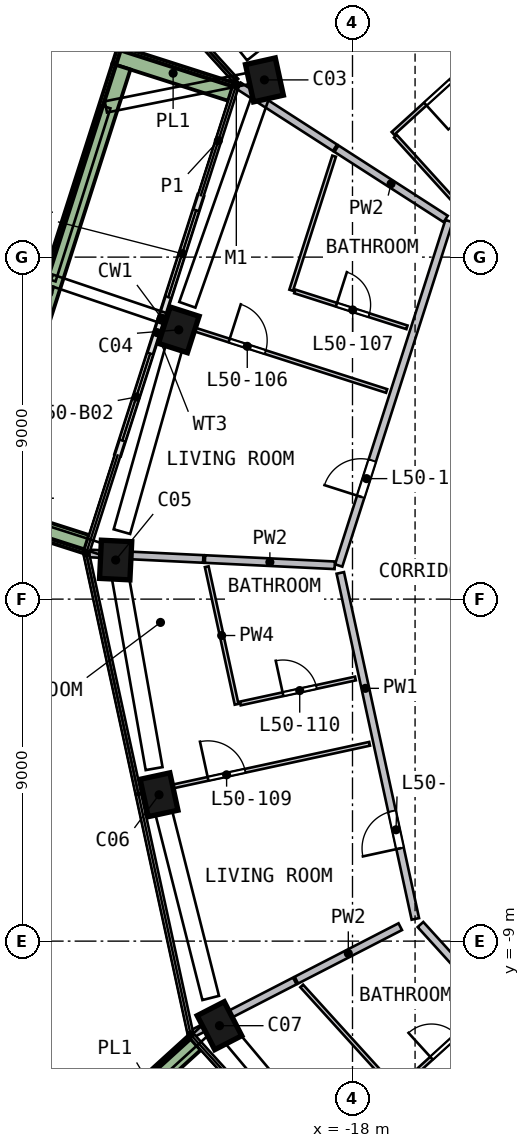
"""IFC4 building model, lengths in metres.
Left out: names, types, materials, properties, quantities, classifications, styles, units other than length and angle.
Written with IfcOpenShell. Run it as: python <this file> out.ifc"""

import sys

from ifc_helpers import new_model, si_unit, direction, frame, frame_2d, origin, origin_2d, place, context, subcontext, project, spatial, rectangle, extrude, element, fill, save


model = new_model("IFC4")
c1 = context("Model", 3, precision=1e-05, world=origin(), true_north=direction((0.0, 1.0)))
c2 = subcontext(c1, "Body", "Model", "MODEL_VIEW")
j1 = project(units=[si_unit("LENGTHUNIT", "METRE"), si_unit("PLANEANGLEUNIT", "RADIAN")], contexts=[c1])
p1 = place(None, origin())
s1 = spatial("IfcSite", under=j1, at=p1, CompositionType="ELEMENT")
p2 = place(p1, origin())
s2 = spatial("IfcBuilding", under=s1, at=p2, CompositionType="ELEMENT")
p3 = place(p2, frame((0.0, 0.0, 205.5)))
s3 = spatial("IfcBuildingStorey", under=s2, at=p3, CompositionType="ELEMENT", Elevation=205.5)
p4 = place(p3, frame((-20.239, 13.781, 0.0), z_axis=(-0.06476386, -0.096765721, 0.993197884), x_axis=(-0.217556406, 0.972715504, 0.080583865)))
e1 = element("IfcColumn", 1, at=p4, inside=s3, PredefinedType="COLUMN", context=c2, shape_type="SweptSolid", body=[
    extrude(rectangle(XDim=1.0, YDim=0.8, at=origin_2d()), origin(), (0.0, 0.0, 1.0), 3.212),
])
p5 = place(p3, frame((-22.531, 7.217, 0.0), z_axis=(-0.033461235, -0.107456192, 0.993646573), x_axis=(-0.303463828, -0.946173408, -0.11254149)))
e2 = element("IfcColumn", 2, at=p5, inside=s3, PredefinedType="COLUMN", context=c2, shape_type="SweptSolid", body=[
    extrude(rectangle(XDim=1.0, YDim=0.8, at=origin_2d()), origin(), (0.0, 0.0, 1.0), 3.21),
])
p6 = place(p3, frame((-24.227, 1.168, 0.0), z_axis=(-0.004561423, -0.115251947, 0.993325819), x_axis=(0.047708269, 0.992179948, 0.115338076)))
e3 = element("IfcColumn", 3, at=p6, inside=s3, PredefinedType="COLUMN", context=c2, shape_type="SweptSolid", body=[
    extrude(rectangle(XDim=1.0, YDim=0.8, at=origin_2d()), origin(), (0.0, 0.0, 1.0), 3.211),
])
p7 = place(p3, frame((-23.121, -5.016, 0.0), z_axis=(0.024791644, -0.109813294, 0.993643002), x_axis=(0.210587098, -0.971071774, -0.112573017)))
e4 = element("IfcColumn", 4, at=p7, inside=s3, PredefinedType="COLUMN", context=c2, shape_type="SweptSolid", body=[
    extrude(rectangle(XDim=1.0, YDim=0.8, at=origin_2d()), origin(), (0.0, 0.0, 1.0), 3.21),
])
p8 = place(p3, frame((-21.565, -11.102, 0.0), z_axis=(0.053672705, -0.102099777, 0.993325161), x_axis=(-0.4547247, 0.883131513, 0.115343736)))
e5 = element("IfcColumn", 5, at=p8, inside=s3, PredefinedType="COLUMN", context=c2, shape_type="SweptSolid", body=[
    extrude(rectangle(XDim=1.0, YDim=0.8, at=origin_2d()), origin(), (0.0, 0.0, 1.0), 3.211),
])
p9 = place(p3, frame((-21.994, 10.615, 0.0), z_axis=(0.0, 0.0, 1.0), x_axis=(-0.305046694, -0.952337395, 0.0)))
e6 = element("IfcWall", 6, at=p9, inside=s3, PredefinedType="SOLIDWALL", context=c2, shape_type="SweptSolid", body=[
    extrude(rectangle(XDim=3.4, YDim=0.15, at=frame_2d((1.7, 0.0))), origin(), (0.0, 0.0, 1.0), 2.475),
])
p10 = place(p9, frame((0.4, 0.0, 0.0)))
e7 = element("IfcOpeningElement", 7, at=p10, cuts=e6, PredefinedType="OPENING", context=c2, shape_type="SweptSolid", body=[
    extrude(rectangle(XDim=2.4, YDim=2.4, at=frame_2d((1.2, 1.2))), frame((0.0, 0.085, 0.0), z_axis=(0.0, -1.0, 0.0), x_axis=(1.0, 0.0, 0.0)), (0.0, 0.0, 1.0), 0.17),
])
p11 = place(p3, frame((-23.031, 7.377, 0.0), z_axis=(0.0, 0.0, 1.0), x_axis=(-0.305067752, -0.95233065, 0.0)))
e8 = element("IfcWall", 8, at=p11, inside=s3, PredefinedType="SOLIDWALL", context=c2, shape_type="SweptSolid", body=[
    extrude(rectangle(XDim=3.761, YDim=0.15, at=frame_2d((1.881, 0.0))), origin(), (0.0, 0.0, 1.0), 2.475),
])
p12 = place(p11, frame((0.961, 0.0, 0.0)))
e9 = element("IfcOpeningElement", 9, at=p12, cuts=e8, PredefinedType="OPENING", context=c2, shape_type="SweptSolid", body=[
    extrude(rectangle(XDim=2.4, YDim=2.4, at=frame_2d((1.2, 1.2))), frame((0.0, 0.085, 0.0), z_axis=(0.0, -1.0, 0.0), x_axis=(1.0, 0.0, 0.0)), (0.0, 0.0, 1.0), 0.17),
])
p13 = place(p3, frame((-21.197, 13.352, 0.0), z_axis=(0.0, 0.0, 1.0), x_axis=(-0.952341705, 0.305033239, 0.0)))
e10 = element("IfcWall", 10, at=p13, inside=s3, PredefinedType="SOLIDWALL", context=c2, shape_type="SweptSolid", body=[
    extrude(rectangle(XDim=3.199, YDim=0.5, at=frame_2d((1.6, 0.0))), origin(), (0.0, 0.0, 1.0), 0.7),
])
p14 = place(p3, frame((-24.082, 14.013, 0.0), z_axis=(0.0, 0.0, 1.0), x_axis=(-0.305020213, -0.952345877, 0.0)))
e11 = element("IfcWall", 11, at=p14, inside=s3, PredefinedType="SOLIDWALL", context=c2, shape_type="SweptSolid", body=[
    extrude(rectangle(XDim=12.5, YDim=0.5, at=frame_2d((6.25, 0.0))), origin(), (0.0, 0.0, 1.0), 0.7),
])
p15 = place(p3, frame((-27.58, 2.271, 0.0), z_axis=(0.0, 0.0, 1.0), x_axis=(0.952352706, -0.304998891, 0.0)))
e12 = element("IfcWall", 12, at=p15, inside=s3, PredefinedType="SOLIDWALL", context=c2, shape_type="SweptSolid", body=[
    extrude(rectangle(XDim=2.699, YDim=0.5, at=frame_2d((1.35, 0.0))), origin(), (0.0, 0.0, 1.0), 0.7),
])
p16 = place(p3, frame((-22.162, -11.681, 0.0), z_axis=(0.0, 0.0, 1.0), x_axis=(-0.74028876, -0.672289039, 0.0)))
e13 = element("IfcWall", 13, at=p16, inside=s3, PredefinedType="SOLIDWALL", context=c2, shape_type="SweptSolid", body=[
    extrude(rectangle(XDim=3.199, YDim=0.5, at=frame_2d((1.6, 0.0))), origin(), (0.0, 0.0, 1.0), 0.7),
])
p17 = place(p3, frame((-16.346, -8.415, 0.0), z_axis=(0.0, 0.0, 1.0), x_axis=(-0.211999887, 0.97726969, 0.0)))
e14 = element("IfcWall", 14, at=p17, inside=s3, PredefinedType="SOLIDWALL", context=c2, shape_type="SweptSolid", body=[
    extrude(rectangle(XDim=9.316, YDim=0.2, at=frame_2d((4.658, 0.0))), origin(), (0.0, 0.0, 1.0), 3.19),
])
p18 = place(p17, frame((1.9, 0.0, 0.0)))
e15 = element("IfcOpeningElement", 15, at=p18, cuts=e14, PredefinedType="OPENING", context=c2, shape_type="SweptSolid", body=[
    extrude(rectangle(XDim=1.0, YDim=2.1, at=frame_2d((0.5, 1.05))), frame((0.0, 0.11, 0.0), z_axis=(0.0, -1.0, 0.0), x_axis=(1.0, 0.0, 0.0)), (0.0, 0.0, 1.0), 0.22),
])
p19 = place(p3, frame((-18.363, 0.885, 0.0), z_axis=(0.0, 0.0, 1.0), x_axis=(0.305000051, 0.952352334, 0.0)))
e16 = element("IfcWall", 16, at=p19, inside=s3, PredefinedType="SOLIDWALL", context=c2, shape_type="SweptSolid", body=[
    extrude(rectangle(XDim=9.517, YDim=0.2, at=frame_2d((4.758, 0.0))), origin(), (0.0, 0.0, 1.0), 3.19),
])
p20 = place(p19, frame((1.9, 0.0, 0.0)))
e17 = element("IfcOpeningElement", 17, at=p20, cuts=e16, PredefinedType="OPENING", context=c2, shape_type="SweptSolid", body=[
    extrude(rectangle(XDim=1.0, YDim=2.1, at=frame_2d((0.5, 1.05))), frame((0.0, 0.11, 0.0), z_axis=(0.0, -1.0, 0.0), x_axis=(1.0, 0.0, 0.0)), (0.0, 0.0, 1.0), 0.22),
])
p21 = place(p3, frame((-12.887, 12.556, 0.0), z_axis=(0.0, 0.0, 1.0), x_axis=(-0.672229236, 0.740343066, 0.0)))
e18 = element("IfcWall", 18, at=p21, inside=s3, PredefinedType="SOLIDWALL", context=c2, shape_type="SweptSolid", body=[
    extrude(rectangle(XDim=9.043, YDim=0.2, at=frame_2d((4.521, 0.0))), origin(), (0.0, 0.0, 1.0), 3.19),
])
p22 = place(p21, frame((4.8, 0.0, 0.0)))
e19 = element("IfcOpeningElement", 19, at=p22, cuts=e18, PredefinedType="OPENING", context=c2, shape_type="SweptSolid", body=[
    extrude(rectangle(XDim=1.0, YDim=2.1, at=frame_2d((0.5, 1.05))), frame((0.0, 0.11, 0.0), z_axis=(0.0, -1.0, 0.0), x_axis=(1.0, 0.0, 0.0)), (0.0, 0.0, 1.0), 0.22),
])
p23 = place(p3, frame((-17.337, 20.73, 0.0), z_axis=(0.0, 0.0, 1.0), x_axis=(0.672244033, -0.74032963, 0.0)))
e20 = element("IfcWall", 20, at=p23, inside=s3, PredefinedType="SOLIDWALL", context=c2, shape_type="SweptSolid", body=[
    extrude(rectangle(XDim=9.043, YDim=0.2, at=frame_2d((4.522, 0.0))), origin(), (0.0, 0.0, 1.0), 3.19),
])
p24 = place(p23, frame((3.2, 0.0, 0.0)))
e21 = element("IfcOpeningElement", 21, at=p24, cuts=e20, PredefinedType="OPENING", context=c2, shape_type="SweptSolid", body=[
    extrude(rectangle(XDim=1.0, YDim=2.1, at=frame_2d((0.5, 1.05))), frame((0.0, 0.11, 0.0), z_axis=(0.0, -1.0, 0.0), x_axis=(1.0, 0.0, 0.0)), (0.0, 0.0, 1.0), 0.22),
])
p25 = place(p3, frame((-9.948, -15.46, 0.0), z_axis=(0.0, 0.0, 1.0), x_axis=(-0.672246163, 0.740327695, 0.0)))
e22 = element("IfcWall", 22, at=p25, inside=s3, PredefinedType="SOLIDWALL", context=c2, shape_type="SweptSolid", body=[
    extrude(rectangle(XDim=9.316, YDim=0.2, at=frame_2d((4.658, 0.0))), origin(), (0.0, 0.0, 1.0), 3.19),
])
p26 = place(p25, frame((5.15, 0.0, 0.0)))
e23 = element("IfcOpeningElement", 23, at=p26, cuts=e22, PredefinedType="OPENING", context=c2, shape_type="SweptSolid", body=[
    extrude(rectangle(XDim=1.0, YDim=2.1, at=frame_2d((0.5, 1.05))), frame((0.0, 0.11, 0.0), z_axis=(0.0, -1.0, 0.0), x_axis=(1.0, 0.0, 0.0)), (0.0, 0.0, 1.0), 0.22),
])
p27 = place(p3, frame((-21.927, 1.057, 0.0), z_axis=(0.0, 0.0, 1.0), x_axis=(-0.998839714, 0.048158343, 0.0)))
e24 = element("IfcWall", 24, at=p27, inside=s3, PredefinedType="SOLIDWALL", context=c2, shape_type="SweptSolid", body=[
    extrude(rectangle(XDim=3.011, YDim=0.2, at=frame_2d((1.506, 0.0))), origin(), (0.0, 0.0, 1.0), 3.19),
])
p28 = place(p3, frame((-19.518, -10.048, 0.0), z_axis=(0.0, 0.0, 1.0), x_axis=(-0.889095542, -0.457721659, 0.0)))
e25 = element("IfcWall", 25, at=p28, inside=s3, PredefinedType="SOLIDWALL", context=c2, shape_type="SweptSolid", body=[
    extrude(rectangle(XDim=3.011, YDim=0.2, at=frame_2d((1.506, 0.0))), origin(), (0.0, 0.0, 1.0), 3.19),
])
p29 = place(p3, frame((-18.467, 0.89, 0.0), z_axis=(0.0, 0.0, 1.0), x_axis=(-0.99884083, 0.048135187, 0.0)))
e26 = element("IfcWall", 26, at=p29, inside=s3, PredefinedType="SOLIDWALL", context=c2, shape_type="SweptSolid", body=[
    extrude(rectangle(XDim=3.418, YDim=0.2, at=frame_2d((1.709, 0.0))), origin(), (0.0, 0.0, 1.0), 3.19),
])
p30 = place(p3, frame((-18.461, 11.879, 0.0), z_axis=(0.0, 0.0, 1.0), x_axis=(-0.840933425, 0.541138592, 0.0)))
e27 = element("IfcWall", 27, at=p30, inside=s3, PredefinedType="SOLIDWALL", context=c2, shape_type="SweptSolid", body=[
    extrude(rectangle(XDim=3.011, YDim=0.2, at=frame_2d((1.506, 0.0))), origin(), (0.0, 0.0, 1.0), 3.19),
])
p31 = place(p3, frame((-16.743, -8.62, 0.0), z_axis=(0.0, 0.0, 1.0), x_axis=(-0.889125357, -0.45766374, 0.0)))
e28 = element("IfcWall", 28, at=p31, inside=s3, PredefinedType="SOLIDWALL", context=c2, shape_type="SweptSolid", body=[
    extrude(rectangle(XDim=3.075, YDim=0.2, at=frame_2d((1.537, 0.0))), origin(), (0.0, 0.0, 1.0), 3.19),
])
p32 = place(p3, frame((-15.548, 10.004, 0.0), z_axis=(0.0, 0.0, 1.0), x_axis=(-0.84093939, 0.541129321, 0.0)))
e29 = element("IfcWall", 29, at=p32, inside=s3, PredefinedType="SOLIDWALL", context=c2, shape_type="SweptSolid", body=[
    extrude(rectangle(XDim=3.418, YDim=0.2, at=frame_2d((1.709, 0.0))), origin(), (0.0, 0.0, 1.0), 3.19),
])
p33 = place(p3, frame((-21.835, 0.852, 0.0), z_axis=(0.0, 0.0, 1.0), x_axis=(0.212049247, -0.977258981, 0.0)))
e30 = element("IfcWall", 30, at=p33, inside=s3, PredefinedType="PARTITIONING", context=c2, shape_type="SweptSolid", body=[
    extrude(rectangle(XDim=3.704, YDim=0.1, at=frame_2d((1.852, 0.0))), origin(), (0.0, 0.0, 1.0), 3.19),
])
p34 = place(p3, frame((-23.56, -5.111, 0.0), z_axis=(0.0, 0.0, 1.0), x_axis=(0.977272998, 0.211984638, 0.0)))
e31 = element("IfcWall", 31, at=p34, inside=s3, PredefinedType="PARTITIONING", context=c2, shape_type="SweptSolid", body=[
    extrude(rectangle(XDim=6.15, YDim=0.1, at=frame_2d((3.075, 0.0))), origin(), (0.0, 0.0, 1.0), 3.19),
])
p35 = place(p34, frame((1.8, 0.0, 0.0)))
e32 = element("IfcOpeningElement", 32, at=p35, cuts=e31, PredefinedType="OPENING", context=c2, shape_type="SweptSolid", body=[
    extrude(rectangle(XDim=1.0, YDim=2.1, at=frame_2d((0.5, 1.05))), frame((0.0, 0.06, 0.0), z_axis=(0.0, -1.0, 0.0), x_axis=(1.0, 0.0, 0.0)), (0.0, 0.0, 1.0), 0.12),
])
p36 = place(p3, frame((-22.959, 7.354, 0.0), z_axis=(0.0, 0.0, 1.0), x_axis=(0.952341145, -0.305034988, 0.0)))
e33 = element("IfcWall", 33, at=p36, inside=s3, PredefinedType="PARTITIONING", context=c2, shape_type="SweptSolid", body=[
    extrude(rectangle(XDim=6.15, YDim=0.1, at=frame_2d((3.075, 0.0))), origin(), (0.0, 0.0, 1.0), 3.19),
])
p37 = place(p36, frame((1.8, 0.0, 0.0)))
e34 = element("IfcOpeningElement", 34, at=p37, cuts=e33, PredefinedType="OPENING", context=c2, shape_type="SweptSolid", body=[
    extrude(rectangle(XDim=1.0, YDim=2.1, at=frame_2d((0.5, 1.05))), frame((0.0, 0.06, 0.0), z_axis=(0.0, -1.0, 0.0), x_axis=(1.0, 0.0, 0.0)), (0.0, 0.0, 1.0), 0.12),
])
p38 = place(p3, frame((-20.952, -2.746, 0.0), z_axis=(0.0, 0.0, 1.0), x_axis=(0.977267964, 0.212007846, 0.0)))
e35 = element("IfcWall", 35, at=p38, inside=s3, PredefinedType="PARTITIONING", context=c2, shape_type="SweptSolid", body=[
    extrude(rectangle(XDim=3.1, YDim=0.1, at=frame_2d((1.55, 0.0))), origin(), (0.0, 0.0, 1.0), 3.19),
])
p39 = place(p38, frame((1.15, 0.0, 0.0)))
e36 = element("IfcOpeningElement", 36, at=p39, cuts=e35, PredefinedType="OPENING", context=c2, shape_type="SweptSolid", body=[
    extrude(rectangle(XDim=0.9, YDim=2.1, at=frame_2d((0.45, 1.05))), frame((0.0, 0.06, 0.0), z_axis=(0.0, -1.0, 0.0), x_axis=(1.0, 0.0, 0.0)), (0.0, 0.0, 1.0), 0.12),
])
for number, where, z_axis, x_axis in (
    (37, (-18.484, 11.656, 0.0), (0.0, 0.0, 1.0), (-0.305, -0.952, 0.0)),
    (38, (-16.846, -12.922, 0.0), (0.0, 0.0, 1.0), (-0.672, 0.74, 0.0)),
):
    element("IfcWall", number, at=place(p3, frame(where, z_axis=z_axis, x_axis=x_axis)), inside=s3, PredefinedType="PARTITIONING", context=c2, shape_type="SweptSolid", body=[
        extrude(rectangle(XDim=3.704, YDim=0.1, at=frame_2d((1.852, 0.0))), origin(), (0.0, 0.0, 1.0), 3.19),
    ])
p40 = place(p3, frame((-19.518, 8.098, 0.0), z_axis=(0.0, 0.0, 1.0), x_axis=(0.952342726, -0.305030051, 0.0)))
e39 = element("IfcWall", 39, at=p40, inside=s3, PredefinedType="PARTITIONING", context=c2, shape_type="SweptSolid", body=[
    extrude(rectangle(XDim=3.1, YDim=0.1, at=frame_2d((1.55, 0.0))), origin(), (0.0, 0.0, 1.0), 3.19),
])
p41 = place(p40, frame((1.15, 0.0, 0.0)))
e40 = element("IfcOpeningElement", 40, at=p41, cuts=e39, PredefinedType="OPENING", context=c2, shape_type="SweptSolid", body=[
    extrude(rectangle(XDim=0.9, YDim=2.1, at=frame_2d((0.45, 1.05))), frame((0.0, 0.06, 0.0), z_axis=(0.0, -1.0, 0.0), x_axis=(1.0, 0.0, 0.0)), (0.0, 0.0, 1.0), 0.12),
])
p42 = place(p3, frame((-15.256, 10.405, 0.0), z_axis=(0.0, 0.0, 1.0), x_axis=(-0.672262592, 0.740312777, 0.0)))
e41 = element("IfcWall", 41, at=p42, inside=s3, PredefinedType="PARTITIONING", context=c2, shape_type="SweptSolid", body=[
    extrude(rectangle(XDim=2.4, YDim=0.1, at=frame_2d((1.2, 0.0))), origin(), (0.0, 0.0, 1.0), 3.19),
])
p43 = place(p3, frame((-14.715, 14.272, 0.0), z_axis=(0.0, 0.0, 1.0), x_axis=(-0.740304513, -0.672271692, 0.0)))
e42 = element("IfcWall", 42, at=p43, inside=s3, PredefinedType="PARTITIONING", context=c2, shape_type="SweptSolid", body=[
    extrude(rectangle(XDim=3.0, YDim=0.1, at=frame_2d((1.5, 0.0))), origin(), (0.0, 0.0, 1.0), 3.19),
])
p44 = place(p43, frame((0.95, 0.0, 0.0)))
e43 = element("IfcOpeningElement", 43, at=p44, cuts=e42, PredefinedType="OPENING", context=c2, shape_type="SweptSolid", body=[
    extrude(rectangle(XDim=0.9, YDim=2.1, at=frame_2d((0.45, 1.05))), frame((0.0, 0.06, 0.0), z_axis=(0.0, -1.0, 0.0), x_axis=(1.0, 0.0, 0.0)), (0.0, 0.0, 1.0), 0.12),
])
p45 = place(p3, frame((-16.772, -12.854, 0.0), z_axis=(0.0, 0.0, 1.0), x_axis=(0.74031058, 0.672265011, 0.0)))
e44 = element("IfcWall", 44, at=p45, inside=s3, PredefinedType="PARTITIONING", context=c2, shape_type="SweptSolid", body=[
    extrude(rectangle(XDim=3.1, YDim=0.1, at=frame_2d((1.55, 0.0))), origin(), (0.0, 0.0, 1.0), 3.19),
])
p46 = place(p45, frame((1.15, 0.0, 0.0)))
e45 = element("IfcOpeningElement", 45, at=p46, cuts=e44, PredefinedType="OPENING", context=c2, shape_type="SweptSolid", body=[
    extrude(rectangle(XDim=0.9, YDim=2.1, at=frame_2d((0.45, 1.05))), frame((0.0, 0.06, 0.0), z_axis=(0.0, -1.0, 0.0), x_axis=(1.0, 0.0, 0.0)), (0.0, 0.0, 1.0), 0.12),
])
p47 = place(p10, origin())
e46 = element("IfcDoor", 46, at=p47, inside=s3, OperationType="SLIDING_TO_RIGHT", PredefinedType="DOOR", context=c2, shape_type="SweptSolid", body=[
    extrude(rectangle(XDim=2.4, YDim=2.4, at=frame_2d((1.2, 1.2))), frame((0.0, 0.025, 0.0), z_axis=(0.0, -1.0, 0.0), x_axis=(1.0, 0.0, 0.0)), (0.0, 0.0, 1.0), 0.05),
])
fill(e7, e46)
p48 = place(p12, origin())
e47 = element("IfcDoor", 47, at=p48, inside=s3, OperationType="SLIDING_TO_LEFT", PredefinedType="DOOR", context=c2, shape_type="SweptSolid", body=[
    extrude(rectangle(XDim=2.4, YDim=2.4, at=frame_2d((1.2, 1.2))), frame((0.0, 0.025, 0.0), z_axis=(0.0, -1.0, 0.0), x_axis=(1.0, 0.0, 0.0)), (0.0, 0.0, 1.0), 0.05),
])
fill(e9, e47)
p49 = place(p44, origin())
e48 = element("IfcDoor", 48, at=p49, inside=s3, OperationType="SINGLE_SWING_RIGHT", PredefinedType="DOOR", context=c2, shape_type="SweptSolid", body=[
    extrude(rectangle(XDim=0.9, YDim=2.1, at=frame_2d((0.45, 1.05))), frame((0.0, 0.025, 0.0), z_axis=(0.0, -1.0, 0.0), x_axis=(1.0, 0.0, 0.0)), (0.0, 0.0, 1.0), 0.05),
])
fill(e43, e48)
p50 = place(p20, origin())
e49 = element("IfcDoor", 49, at=p50, inside=s3, OperationType="SINGLE_SWING_LEFT", PredefinedType="DOOR", context=c2, shape_type="SweptSolid", body=[
    extrude(rectangle(XDim=1.0, YDim=2.1, at=frame_2d((0.5, 1.05))), frame((0.0, 0.025, 0.0), z_axis=(0.0, -1.0, 0.0), x_axis=(1.0, 0.0, 0.0)), (0.0, 0.0, 1.0), 0.05),
])
fill(e17, e49)
p51 = place(p37, origin())
e50 = element("IfcDoor", 50, at=p51, inside=s3, OperationType="SINGLE_SWING_LEFT", PredefinedType="DOOR", context=c2, shape_type="SweptSolid", body=[
    extrude(rectangle(XDim=1.0, YDim=2.1, at=frame_2d((0.5, 1.05))), frame((0.0, 0.025, 0.0), z_axis=(0.0, -1.0, 0.0), x_axis=(1.0, 0.0, 0.0)), (0.0, 0.0, 1.0), 0.05),
])
fill(e34, e50)
p52 = place(p41, origin())
e51 = element("IfcDoor", 51, at=p52, inside=s3, OperationType="SINGLE_SWING_LEFT", PredefinedType="DOOR", context=c2, shape_type="SweptSolid", body=[
    extrude(rectangle(XDim=0.9, YDim=2.1, at=frame_2d((0.45, 1.05))), frame((0.0, 0.025, 0.0), z_axis=(0.0, -1.0, 0.0), x_axis=(1.0, 0.0, 0.0)), (0.0, 0.0, 1.0), 0.05),
])
fill(e40, e51)
p53 = place(p18, origin())
e52 = element("IfcDoor", 52, at=p53, inside=s3, OperationType="SINGLE_SWING_LEFT", PredefinedType="DOOR", context=c2, shape_type="SweptSolid", body=[
    extrude(rectangle(XDim=1.0, YDim=2.1, at=frame_2d((0.5, 1.05))), frame((0.0, 0.025, 0.0), z_axis=(0.0, -1.0, 0.0), x_axis=(1.0, 0.0, 0.0)), (0.0, 0.0, 1.0), 0.05),
])
fill(e15, e52)
p54 = place(p35, origin())
e53 = element("IfcDoor", 53, at=p54, inside=s3, OperationType="SINGLE_SWING_LEFT", PredefinedType="DOOR", context=c2, shape_type="SweptSolid", body=[
    extrude(rectangle(XDim=1.0, YDim=2.1, at=frame_2d((0.5, 1.05))), frame((0.0, 0.025, 0.0), z_axis=(0.0, -1.0, 0.0), x_axis=(1.0, 0.0, 0.0)), (0.0, 0.0, 1.0), 0.05),
])
fill(e32, e53)
p55 = place(p39, origin())
e54 = element("IfcDoor", 54, at=p55, inside=s3, OperationType="SINGLE_SWING_LEFT", PredefinedType="DOOR", context=c2, shape_type="SweptSolid", body=[
    extrude(rectangle(XDim=0.9, YDim=2.1, at=frame_2d((0.45, 1.05))), frame((0.0, 0.025, 0.0), z_axis=(0.0, -1.0, 0.0), x_axis=(1.0, 0.0, 0.0)), (0.0, 0.0, 1.0), 0.05),
])
fill(e36, e54)
p56 = place(p46, origin())
e55 = element("IfcDoor", 55, at=p56, inside=s3, OperationType="SINGLE_SWING_LEFT", PredefinedType="DOOR", context=c2, shape_type="SweptSolid", body=[
    extrude(rectangle(XDim=0.9, YDim=2.1, at=frame_2d((0.45, 1.05))), frame((0.0, 0.025, 0.0), z_axis=(0.0, -1.0, 0.0), x_axis=(1.0, 0.0, 0.0)), (0.0, 0.0, 1.0), 0.05),
])
fill(e45, e55)
save(model, sys.argv[1])
